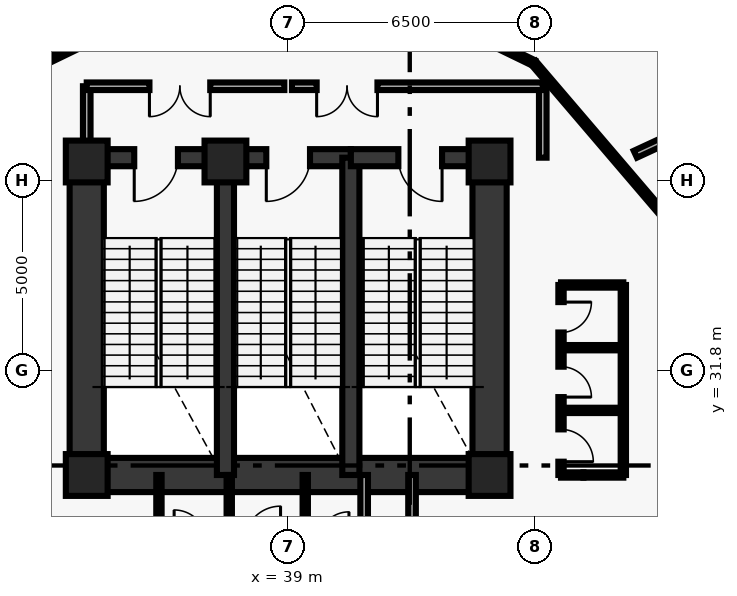
"""IFC4 building model, lengths in metres.
Left out: names, types, materials, properties, quantities, classifications, styles, units other than length and angle.
Written with IfcOpenShell. Run it as: python <this file> out.ifc"""

import sys

from ifc_helpers import new_model, si_unit, direction, frame, frame_2d, origin, origin_2d, place, context, subcontext, project, spatial, rectangle, extrude, element, fill, save


model = new_model("IFC4")
c1 = context("Model", 3, precision=1e-05, world=origin(), true_north=direction((0.0, 1.0)))
c2 = subcontext(c1, "Body", "Model", "MODEL_VIEW")
j1 = project(units=[si_unit("LENGTHUNIT", "METRE"), si_unit("PLANEANGLEUNIT", "RADIAN")], contexts=[c1])
p1 = place(None, origin())
s1 = spatial("IfcSite", under=j1, at=p1, CompositionType="ELEMENT")
p2 = place(p1, origin())
s2 = spatial("IfcBuilding", under=s1, at=p2, CompositionType="ELEMENT")
p3 = place(p2, frame((0.0, 0.0, 6.0)))
s3 = spatial("IfcBuildingStorey", under=s2, at=p3, CompositionType="ELEMENT", Elevation=6.0)
for number, where, z_axis, x_axis in (
    (1, (44.3, 29.05, 0.0), (0.0, 0.0, 1.0), (1.0, 0.0, 0.0)),
    (2, (44.3, 37.3, 0.0), (0.0, 0.0, 1.0), (1.0, 0.0, 0.0)),
    (3, (37.35, 37.3, 0.0), (0.0, 0.0, 1.0), (1.0, 0.0, 0.0)),
    (4, (33.7, 37.3, 0.0), (0.0, 0.0, 1.0), (1.0, 0.0, 0.0)),
    (5, (33.7, 29.05, 0.0), (0.0, 0.0, 1.0), (1.0, 0.0, 0.0)),
):
    element("IfcColumn", number, at=place(p3, frame(where, z_axis=z_axis, x_axis=x_axis)), inside=s3, PredefinedType="PILASTER", context=c2, shape_type="SweptSolid", body=[
        extrude(rectangle(XDim=1.1, YDim=1.1, at=origin_2d()), origin(), (0.0, 0.0, 1.0), 4.7),
    ])
for number, where, z_axis, x_axis in (
    (6, (33.7, 29.05, 0.0), (0.0, 0.0, 1.0), (0.0, 1.0, 0.0)),
    (7, (44.3, 29.05, 0.0), (0.0, 0.0, 1.0), (0.0, 1.0, 0.0)),
):
    element("IfcWall", number, at=place(p3, frame(where, z_axis=z_axis, x_axis=x_axis)), inside=s3, PredefinedType="SHEAR", context=c2, shape_type="SweptSolid", body=[
        extrude(rectangle(XDim=8.35, YDim=0.9, at=frame_2d((4.175, 0.0))), origin(), (0.0, 0.0, 1.0), 4.7),
    ])
p4 = place(p3, frame((33.7, 29.05, 0.0), z_axis=(0.0, 0.0, 1.0), x_axis=(1.0, 0.0, 0.0)))
e8 = element("IfcWall", 8, at=p4, inside=s3, PredefinedType="SHEAR", context=c2, shape_type="SweptSolid", body=[
    extrude(rectangle(XDim=10.6, YDim=0.9, at=frame_2d((5.3, 0.0))), origin(), (0.0, 0.0, 1.0), 4.7),
])
p5 = place(p3, frame((37.35, 37.4, 0.0), z_axis=(0.0, 0.0, 1.0), x_axis=(-1.0, 0.0, 0.0)))
e9 = element("IfcWall", 9, at=p5, inside=s3, PredefinedType="SHEAR", context=c2, shape_type="SweptSolid", body=[
    extrude(rectangle(XDim=3.65, YDim=0.45, at=frame_2d((1.825, 0.0))), origin(), (0.0, 0.0, 1.0), 4.7),
])
p6 = place(p5, frame((1.25, 0.0, 0.0)))
e10 = element("IfcOpeningElement", 10, at=p6, cuts=e9, PredefinedType="OPENING", context=c2, shape_type="SweptSolid", body=[
    extrude(rectangle(XDim=1.15, YDim=2.15, at=frame_2d((0.575, 1.075))), frame((0.0, 0.235, 0.0), z_axis=(0.0, -1.0, 0.0), x_axis=(1.0, 0.0, 0.0)), (0.0, 0.0, 1.0), 0.47),
])
p7 = place(p3, frame((37.35, 29.05, 0.0), z_axis=(0.0, 0.0, 1.0), x_axis=(0.0, 1.0, 0.0)))
e11 = element("IfcWall", 11, at=p7, inside=s3, PredefinedType="SHEAR", context=c2, shape_type="SweptSolid", body=[
    extrude(rectangle(XDim=8.35, YDim=0.45, at=frame_2d((4.175, 0.0))), origin(), (0.0, 0.0, 1.0), 4.7),
])
p8 = place(p3, frame((40.65, 37.4, 0.0), z_axis=(0.0, 0.0, 1.0), x_axis=(-1.0, 0.0, 0.0)))
e12 = element("IfcWall", 12, at=p8, inside=s3, PredefinedType="SHEAR", context=c2, shape_type="SweptSolid", body=[
    extrude(rectangle(XDim=3.3, YDim=0.45, at=frame_2d((1.65, 0.0))), origin(), (0.0, 0.0, 1.0), 4.7),
])
p9 = place(p8, frame((1.075, 0.0, 0.0)))
e13 = element("IfcOpeningElement", 13, at=p9, cuts=e12, PredefinedType="OPENING", context=c2, shape_type="SweptSolid", body=[
    extrude(rectangle(XDim=1.15, YDim=2.15, at=frame_2d((0.575, 1.075))), frame((0.0, 0.235, 0.0), z_axis=(0.0, -1.0, 0.0), x_axis=(1.0, 0.0, 0.0)), (0.0, 0.0, 1.0), 0.47),
])
p10 = place(p3, frame((40.65, 29.05, 0.0), z_axis=(0.0, 0.0, 1.0), x_axis=(0.0, 1.0, 0.0)))
e14 = element("IfcWall", 14, at=p10, inside=s3, PredefinedType="SHEAR", context=c2, shape_type="SweptSolid", body=[
    extrude(rectangle(XDim=8.35, YDim=0.45, at=frame_2d((4.175, 0.0))), origin(), (0.0, 0.0, 1.0), 4.7),
])
p11 = place(p3, frame((44.3, 37.4, 0.0), z_axis=(0.0, 0.0, 1.0), x_axis=(-1.0, 0.0, 0.0)))
e15 = element("IfcWall", 15, at=p11, inside=s3, PredefinedType="SHEAR", context=c2, shape_type="SweptSolid", body=[
    extrude(rectangle(XDim=3.65, YDim=0.45, at=frame_2d((1.825, 0.0))), origin(), (0.0, 0.0, 1.0), 4.7),
])
p12 = place(p11, frame((1.25, 0.0, 0.0)))
e16 = element("IfcOpeningElement", 16, at=p12, cuts=e15, PredefinedType="OPENING", context=c2, shape_type="SweptSolid", body=[
    extrude(rectangle(XDim=1.15, YDim=2.15, at=frame_2d((0.575, 1.075))), frame((0.0, 0.235, 0.0), z_axis=(0.0, -1.0, 0.0), x_axis=(1.0, 0.0, 0.0)), (0.0, 0.0, 1.0), 0.47),
])
for number, where, z_axis, x_axis in (
    (17, (33.7, 37.4, 0.0), (0.0, 0.0, 1.0), (0.0, 1.0, 0.0)),
    (18, (45.7, 37.4, 0.0), (0.0, 0.0, 1.0), (0.0, 1.0, 0.0)),
):
    element("IfcWall", number, at=place(p3, frame(where, z_axis=z_axis, x_axis=x_axis)), inside=s3, PredefinedType="SOLIDWALL", context=c2, shape_type="SweptSolid", body=[
        extrude(rectangle(XDim=1.88, YDim=0.2, at=frame_2d((0.94, 0.0))), origin(), (0.0, 0.0, 1.0), 4.7),
    ])
p13 = place(p3, frame((38.9, 39.28, 0.0), z_axis=(0.0, 0.0, 1.0), x_axis=(-1.0, 0.0, 0.0)))
e19 = element("IfcWall", 19, at=p13, inside=s3, PredefinedType="SOLIDWALL", context=c2, shape_type="SweptSolid", body=[
    extrude(rectangle(XDim=5.2, YDim=0.2, at=frame_2d((2.6, 0.0))), origin(), (0.0, 0.0, 1.0), 4.7),
])
p14 = place(p13, frame((1.95, 0.0, 0.0)))
e20 = element("IfcOpeningElement", 20, at=p14, cuts=e19, PredefinedType="OPENING", context=c2, shape_type="SweptSolid", body=[
    extrude(rectangle(XDim=1.6, YDim=2.2, at=frame_2d((0.8, 1.1))), frame((0.0, 0.11, 0.0), z_axis=(0.0, -1.0, 0.0), x_axis=(1.0, 0.0, 0.0)), (0.0, 0.0, 1.0), 0.22),
])
p15 = place(p3, frame((45.7, 39.28, 0.0), z_axis=(0.0, 0.0, 1.0), x_axis=(-1.0, 0.0, 0.0)))
e21 = element("IfcWall", 21, at=p15, inside=s3, PredefinedType="SOLIDWALL", context=c2, shape_type="SweptSolid", body=[
    extrude(rectangle(XDim=6.6, YDim=0.2, at=frame_2d((3.3, 0.0))), origin(), (0.0, 0.0, 1.0), 4.7),
])
p16 = place(p15, frame((4.35, 0.0, 0.0)))
e22 = element("IfcOpeningElement", 22, at=p16, cuts=e21, PredefinedType="OPENING", context=c2, shape_type="SweptSolid", body=[
    extrude(rectangle(XDim=1.6, YDim=2.2, at=frame_2d((0.8, 1.1))), frame((0.0, 0.11, 0.0), z_axis=(0.0, -1.0, 0.0), x_axis=(1.0, 0.0, 0.0)), (0.0, 0.0, 1.0), 0.22),
])
p17 = place(p3, frame((35.6, 27.28, 0.0), z_axis=(0.0, 0.0, 1.0), x_axis=(0.0, 1.0, 0.0)))
e23 = element("IfcWall", 23, at=p17, inside=s3, PredefinedType="PARTITIONING", context=c2, shape_type="SweptSolid", body=[
    extrude(rectangle(XDim=1.77, YDim=0.14, at=frame_2d((0.885, 0.0))), origin(), (0.0, 0.0, 1.0), 4.7),
])
for number, where, z_axis, x_axis in (
    (24, (41.0, 27.28, 0.0), (0.0, 0.0, 1.0), (0.0, 1.0, 0.0)),
    (25, (42.26, 27.28, 0.0), (0.0, 0.0, 1.0), (0.0, 1.0, 0.0)),
):
    element("IfcWall", number, at=place(p3, frame(where, z_axis=z_axis, x_axis=x_axis)), inside=s3, PredefinedType="SOLIDWALL", context=c2, shape_type="SweptSolid", body=[
        extrude(rectangle(XDim=1.77, YDim=0.2, at=frame_2d((0.885, 0.0))), origin(), (0.0, 0.0, 1.0), 4.7),
    ])
for number, where, z_axis, x_axis in (
    (26, (37.45, 27.28, 0.0), (0.0, 0.0, 1.0), (0.0, 1.0, 0.0)),
    (27, (39.45, 27.28, 0.0), (0.0, 0.0, 1.0), (0.0, 1.0, 0.0)),
):
    element("IfcWall", number, at=place(p3, frame(where, z_axis=z_axis, x_axis=x_axis)), inside=s3, PredefinedType="PARTITIONING", context=c2, shape_type="SweptSolid", body=[
        extrude(rectangle(XDim=1.77, YDim=0.14, at=frame_2d((0.885, 0.0))), origin(), (0.0, 0.0, 1.0), 4.7),
    ])
p18 = place(p3, frame((46.18, 34.05, 0.0), z_axis=(0.0, 0.0, 1.0), x_axis=(0.0, -1.0, 0.0)))
e28 = element("IfcWall", 28, at=p18, inside=s3, PredefinedType="PARTITIONING", context=c2, shape_type="SweptSolid", body=[
    extrude(rectangle(XDim=5.0, YDim=0.14, at=frame_2d((2.5, 0.0))), origin(), (0.0, 0.0, 1.0), 4.7),
])
p19 = place(p18, frame((3.8, 0.0, 0.0)))
e29 = element("IfcOpeningElement", 29, at=p19, cuts=e28, PredefinedType="OPENING", context=c2, shape_type="SweptSolid", body=[
    extrude(rectangle(XDim=0.85, YDim=2.1, at=frame_2d((0.425, 1.05))), frame((0.0, 0.08, 0.0), z_axis=(0.0, -1.0, 0.0), x_axis=(1.0, 0.0, 0.0)), (0.0, 0.0, 1.0), 0.16),
])
p20 = place(p18, frame((2.15, 0.0, 0.0)))
e30 = element("IfcOpeningElement", 30, at=p20, cuts=e28, PredefinedType="OPENING", context=c2, shape_type="SweptSolid", body=[
    extrude(rectangle(XDim=0.8, YDim=2.05, at=frame_2d((0.4, 1.025))), frame((0.0, 0.08, 0.0), z_axis=(0.0, -1.0, 0.0), x_axis=(1.0, 0.0, 0.0)), (0.0, 0.0, 1.0), 0.16),
])
p21 = place(p18, frame((0.45, 0.0, 0.0)))
e31 = element("IfcOpeningElement", 31, at=p21, cuts=e28, PredefinedType="OPENING", context=c2, shape_type="SweptSolid", body=[
    extrude(rectangle(XDim=0.8, YDim=2.05, at=frame_2d((0.4, 1.025))), frame((0.0, 0.08, 0.0), z_axis=(0.0, -1.0, 0.0), x_axis=(1.0, 0.0, 0.0)), (0.0, 0.0, 1.0), 0.16),
])
p22 = place(p3, frame((46.18, 29.05, 0.0), z_axis=(0.0, 0.0, 1.0), x_axis=(1.0, 0.0, 0.0)))
e32 = element("IfcWall", 32, at=p22, inside=s3, PredefinedType="PARTITIONING", context=c2, shape_type="SweptSolid", body=[
    extrude(rectangle(XDim=0.59, YDim=0.14, at=frame_2d((0.295, 0.0))), origin(), (0.0, 0.0, 1.0), 3.66),
])
p23 = place(p3, frame((46.77, 29.05, 0.0), z_axis=(0.0, 0.0, 1.0), x_axis=(1.0, 0.0, 0.0)))
e33 = element("IfcWall", 33, at=p23, inside=s3, PredefinedType="PARTITIONING", context=c2, shape_type="SweptSolid", body=[
    extrude(rectangle(XDim=1.05, YDim=0.14, at=frame_2d((0.525, 0.0))), origin(), (0.0, 0.0, 1.0), 4.7),
])
for number, where, z_axis, x_axis in (
    (34, (46.18, 30.75, 0.0), (0.0, 0.0, 1.0), (1.0, 0.0, 0.0)),
    (35, (46.18, 32.4, 0.0), (0.0, 0.0, 1.0), (1.0, 0.0, 0.0)),
    (36, (46.18, 34.05, 0.0), (0.0, 0.0, 1.0), (1.0, 0.0, 0.0)),
):
    element("IfcWall", number, at=place(p3, frame(where, z_axis=z_axis, x_axis=x_axis)), inside=s3, PredefinedType="PARTITIONING", context=c2, shape_type="SweptSolid", body=[
        extrude(rectangle(XDim=1.64, YDim=0.14, at=frame_2d((0.82, 0.0))), origin(), (0.0, 0.0, 1.0), 4.7),
    ])
p24 = place(p3, frame((47.82, 29.05, 0.0), z_axis=(0.0, 0.0, 1.0), x_axis=(0.0, 1.0, 0.0)))
e37 = element("IfcWall", 37, at=p24, inside=s3, PredefinedType="PARTITIONING", context=c2, shape_type="SweptSolid", body=[
    extrude(rectangle(XDim=5.0, YDim=0.14, at=frame_2d((2.5, 0.0))), origin(), (0.0, 0.0, 1.0), 4.7),
])
p25 = place(p3, frame((50.189, 34.36, 0.0), z_axis=(0.0, 0.0, 1.0), x_axis=(-0.649652680018, 0.760231145998, 0.0)))
e38 = element("IfcWall", 38, at=p25, inside=s3, PredefinedType="PARTITIONING", context=c2, shape_type="SweptSolid", body=[
    extrude(rectangle(XDim=7.279, YDim=0.16, at=frame_2d((3.64, 0.0))), origin(), (0.0, 0.0, 1.0), 4.7),
])
p26 = place(p3, frame((42.344, 41.405, 0.0), z_axis=(0.0, 0.0, 1.0), x_axis=(0.899789784655, -0.436323668199, 0.0)))
e39 = element("IfcWall", 39, at=p26, inside=s3, PredefinedType="PARTITIONING", context=c2, shape_type="SweptSolid", body=[
    extrude(rectangle(XDim=3.463, YDim=0.16, at=frame_2d((1.731, 0.0))), origin(), (0.0, 0.0, 1.0), 4.7),
])
p27 = place(p26, frame((0.2, 0.0, 0.0)))
e40 = element("IfcOpeningElement", 40, at=p27, cuts=e39, PredefinedType="OPENING", context=c2, shape_type="SweptSolid", body=[
    extrude(rectangle(XDim=1.8, YDim=2.3, at=frame_2d((0.9, 1.15))), frame((0.0, 0.09, 0.0), z_axis=(0.0, -1.0, 0.0), x_axis=(1.0, 0.0, 0.0)), (0.0, 0.0, 1.0), 0.18),
])
p28 = place(p3, frame((32.54, 39.894, 0.0), z_axis=(0.0, 0.0, 1.0), x_axis=(0.899789784655, 0.436323668199, 0.0)))
e41 = element("IfcWall", 41, at=p28, inside=s3, PredefinedType="PARTITIONING", context=c2, shape_type="SweptSolid", body=[
    extrude(rectangle(XDim=3.463, YDim=0.16, at=frame_2d((1.731, 0.0))), origin(), (0.0, 0.0, 1.0), 4.7),
])
p29 = place(p28, frame((1.463, 0.0, 0.0)))
e42 = element("IfcOpeningElement", 42, at=p29, cuts=e41, PredefinedType="OPENING", context=c2, shape_type="SweptSolid", body=[
    extrude(rectangle(XDim=1.8, YDim=2.3, at=frame_2d((0.9, 1.15))), frame((0.0, 0.09, 0.0), z_axis=(0.0, -1.0, 0.0), x_axis=(1.0, 0.0, 0.0)), (0.0, 0.0, 1.0), 0.18),
])
p30 = place(p3, frame((48.136, 37.491, 0.0), z_axis=(0.0, 0.0, 1.0), x_axis=(0.907524785669, 0.419998527851, 0.0)))
e43 = element("IfcWall", 43, at=p30, inside=s3, PredefinedType="PARTITIONING", context=c2, shape_type="SweptSolid", body=[
    extrude(rectangle(XDim=5.3, YDim=0.2, at=frame_2d((2.65, 0.0))), origin(), (0.0, 0.0, 1.0), 4.7),
])
p31 = place(p6, origin())
e44 = element("IfcDoor", 44, at=p31, inside=s3, OperationType="SINGLE_SWING_RIGHT", PredefinedType="DOOR", context=c2, shape_type="SweptSolid", body=[
    extrude(rectangle(XDim=1.15, YDim=2.15, at=frame_2d((0.575, 1.075))), frame((0.0, 0.025, 0.0), z_axis=(0.0, -1.0, 0.0), x_axis=(1.0, 0.0, 0.0)), (0.0, 0.0, 1.0), 0.05),
])
fill(e10, e44)
p32 = place(p9, origin())
e45 = element("IfcDoor", 45, at=p32, inside=s3, OperationType="SINGLE_SWING_RIGHT", PredefinedType="DOOR", context=c2, shape_type="SweptSolid", body=[
    extrude(rectangle(XDim=1.15, YDim=2.15, at=frame_2d((0.575, 1.075))), frame((0.0, 0.025, 0.0), z_axis=(0.0, -1.0, 0.0), x_axis=(1.0, 0.0, 0.0)), (0.0, 0.0, 1.0), 0.05),
])
fill(e13, e45)
p33 = place(p12, origin())
e46 = element("IfcDoor", 46, at=p33, inside=s3, OperationType="SINGLE_SWING_LEFT", PredefinedType="DOOR", context=c2, shape_type="SweptSolid", body=[
    extrude(rectangle(XDim=1.15, YDim=2.15, at=frame_2d((0.575, 1.075))), frame((0.0, 0.025, 0.0), z_axis=(0.0, -1.0, 0.0), x_axis=(1.0, 0.0, 0.0)), (0.0, 0.0, 1.0), 0.05),
])
fill(e16, e46)
p34 = place(p14, origin())
e47 = element("IfcDoor", 47, at=p34, inside=s3, OperationType="DOUBLE_DOOR_SINGLE_SWING", PredefinedType="DOOR", context=c2, shape_type="SweptSolid", body=[
    extrude(rectangle(XDim=1.6, YDim=2.2, at=frame_2d((0.8, 1.1))), frame((0.0, 0.025, 0.0), z_axis=(0.0, -1.0, 0.0), x_axis=(1.0, 0.0, 0.0)), (0.0, 0.0, 1.0), 0.05),
])
fill(e20, e47)
p35 = place(p16, origin())
e48 = element("IfcDoor", 48, at=p35, inside=s3, OperationType="DOUBLE_DOOR_SINGLE_SWING", PredefinedType="DOOR", context=c2, shape_type="SweptSolid", body=[
    extrude(rectangle(XDim=1.6, YDim=2.2, at=frame_2d((0.8, 1.1))), frame((0.0, 0.025, 0.0), z_axis=(0.0, -1.0, 0.0), x_axis=(1.0, 0.0, 0.0)), (0.0, 0.0, 1.0), 0.05),
])
fill(e22, e48)
p36 = place(p19, origin())
e49 = element("IfcDoor", 49, at=p36, inside=s3, OperationType="SINGLE_SWING_RIGHT", PredefinedType="DOOR", context=c2, shape_type="SweptSolid", body=[
    extrude(rectangle(XDim=0.85, YDim=2.1, at=frame_2d((0.425, 1.05))), frame((0.0, 0.025, 0.0), z_axis=(0.0, -1.0, 0.0), x_axis=(1.0, 0.0, 0.0)), (0.0, 0.0, 1.0), 0.05),
])
fill(e29, e49)
p37 = place(p20, origin())
e50 = element("IfcDoor", 50, at=p37, inside=s3, OperationType="SINGLE_SWING_RIGHT", PredefinedType="DOOR", context=c2, shape_type="SweptSolid", body=[
    extrude(rectangle(XDim=0.8, YDim=2.05, at=frame_2d((0.4, 1.025))), frame((0.0, 0.025, 0.0), z_axis=(0.0, -1.0, 0.0), x_axis=(1.0, 0.0, 0.0)), (0.0, 0.0, 1.0), 0.05),
])
fill(e30, e50)
p38 = place(p21, origin())
e51 = element("IfcDoor", 51, at=p38, inside=s3, OperationType="SINGLE_SWING_LEFT", PredefinedType="DOOR", context=c2, shape_type="SweptSolid", body=[
    extrude(rectangle(XDim=0.8, YDim=2.05, at=frame_2d((0.4, 1.025))), frame((0.0, 0.025, 0.0), z_axis=(0.0, -1.0, 0.0), x_axis=(1.0, 0.0, 0.0)), (0.0, 0.0, 1.0), 0.05),
])
fill(e31, e51)
save(model, sys.argv[1])
